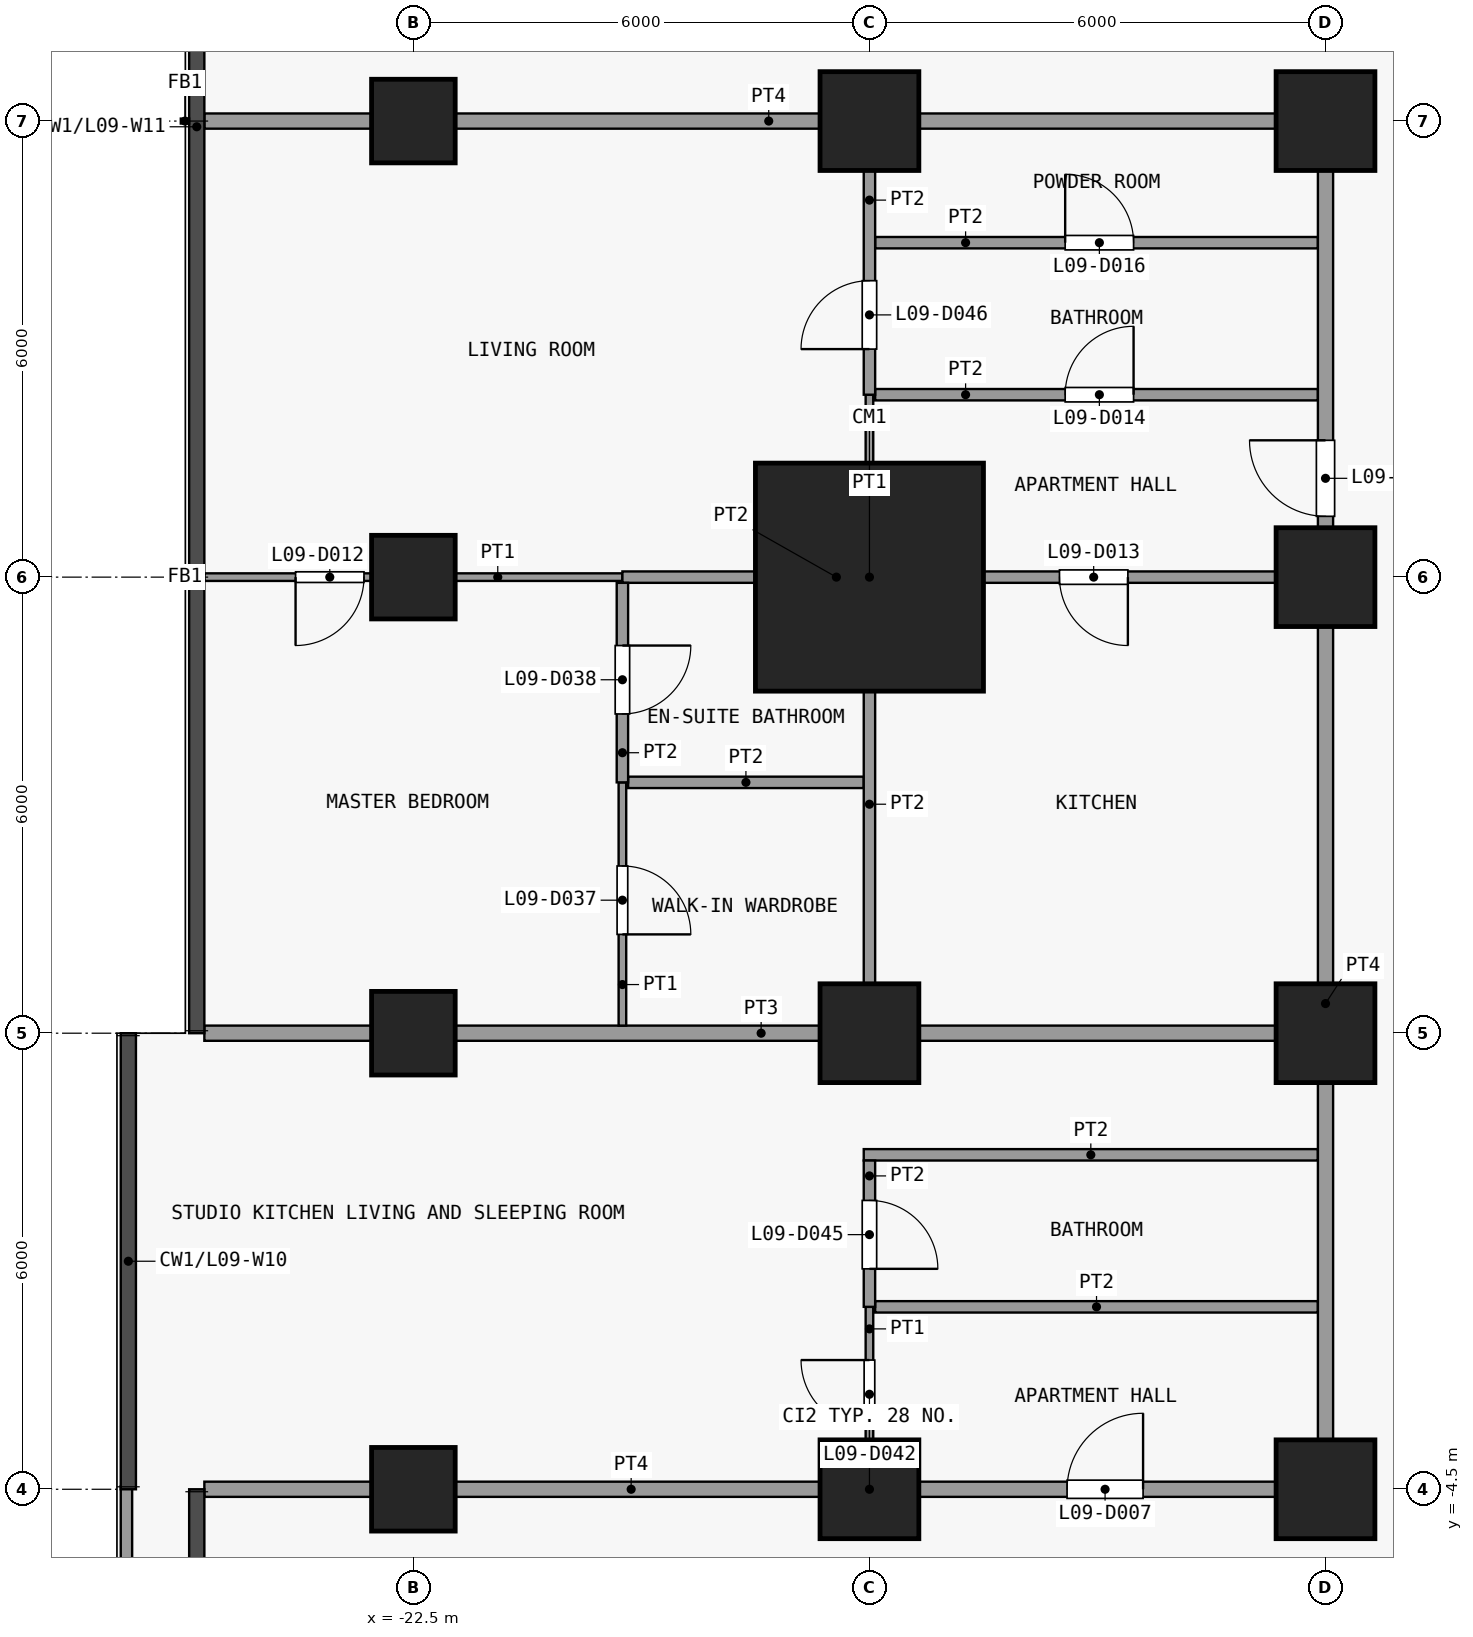
"""IFC4 building model, lengths in metres.
Left out: names, types, materials, properties, quantities, classifications, styles, units other than length and angle.
Written with IfcOpenShell. Run it as: python <this file> out.ifc"""

import sys

from ifc_helpers import new_model, si_unit, direction, frame, frame_2d, origin, origin_2d, place, context, subcontext, project, spatial, rectangle, extrude, element, fill, save


model = new_model("IFC4")
c1 = context("Model", 3, precision=1e-05, world=origin(), true_north=direction((0.0, 1.0)))
c2 = subcontext(c1, "Body", "Model", "MODEL_VIEW")
j1 = project(units=[si_unit("LENGTHUNIT", "METRE"), si_unit("PLANEANGLEUNIT", "RADIAN")], contexts=[c1])
p1 = place(None, origin())
s1 = spatial("IfcSite", under=j1, at=p1, CompositionType="ELEMENT")
p2 = place(p1, origin())
s2 = spatial("IfcBuilding", under=s1, at=p2, CompositionType="ELEMENT")
p3 = place(p2, frame((0.0, 0.0, 43.3)))
s3 = spatial("IfcBuildingStorey", under=s2, at=p3, CompositionType="ELEMENT", Elevation=43.3)
for number, where, z_axis, x_axis in (
    (1, (-22.5, -4.5, 0.0), (0.0, 0.0, 1.0), (1.0, 0.0, 0.0)),
    (2, (-22.5, 1.5, 0.0), (0.0, 0.0, 1.0), (1.0, 0.0, 0.0)),
    (3, (-22.5, 7.5, 0.0), (0.0, 0.0, 1.0), (1.0, 0.0, 0.0)),
    (4, (-22.5, 13.5, 0.0), (0.0, 0.0, 1.0), (1.0, 0.0, 0.0)),
):
    element("IfcColumn", number, at=place(p3, frame(where, z_axis=z_axis, x_axis=x_axis)), inside=s3, PredefinedType="COLUMN", context=c2, shape_type="SweptSolid", body=[
        extrude(rectangle(XDim=1.1, YDim=1.1, at=origin_2d()), origin(), (0.0, 0.0, 1.0), 3.6),
    ])
for number, where, z_axis, x_axis in (
    (5, (-16.5, -4.5, 0.0), (0.0, 0.0, 1.0), (1.0, 0.0, 0.0)),
    (6, (-16.5, 1.5, 0.0), (0.0, 0.0, 1.0), (1.0, 0.0, 0.0)),
):
    element("IfcColumn", number, at=place(p3, frame(where, z_axis=z_axis, x_axis=x_axis)), inside=s3, PredefinedType="COLUMN", context=c2, shape_type="SweptSolid", body=[
        extrude(rectangle(XDim=1.3, YDim=1.3, at=origin_2d()), origin(), (0.0, 0.0, 1.0), 3.6),
    ])
p4 = place(p3, frame((-16.5, 7.5, 0.0), z_axis=(0.0, 0.0, 1.0), x_axis=(1.0, 0.0, 0.0)))
e7 = element("IfcColumn", 7, at=p4, inside=s3, PredefinedType="COLUMN", context=c2, shape_type="SweptSolid", body=[
    extrude(rectangle(XDim=3.0, YDim=3.0, at=origin_2d()), origin(), (0.0, 0.0, 1.0), 3.6),
])
for number, where, z_axis, x_axis in (
    (8, (-16.5, 13.5, 0.0), (0.0, 0.0, 1.0), (1.0, 0.0, 0.0)),
    (9, (-10.5, -4.5, 0.0), (0.0, 0.0, 1.0), (1.0, 0.0, 0.0)),
    (10, (-10.5, 1.5, 0.0), (0.0, 0.0, 1.0), (1.0, 0.0, 0.0)),
    (11, (-10.5, 7.5, 0.0), (0.0, 0.0, 1.0), (1.0, 0.0, 0.0)),
    (12, (-10.5, 13.5, 0.0), (0.0, 0.0, 1.0), (1.0, 0.0, 0.0)),
):
    element("IfcColumn", number, at=place(p3, frame(where, z_axis=z_axis, x_axis=x_axis)), inside=s3, PredefinedType="COLUMN", context=c2, shape_type="SweptSolid", body=[
        extrude(rectangle(XDim=1.3, YDim=1.3, at=origin_2d()), origin(), (0.0, 0.0, 1.0), 3.6),
    ])
p5 = place(p3, frame((-26.275, -13.3, 0.0), z_axis=(0.0, 0.0, 1.0), x_axis=(0.0, 1.0, 0.0)))
e13 = element("IfcWall", 13, at=p5, inside=s3, PredefinedType="PARAPET", context=c2, shape_type="SweptSolid", body=[
    extrude(rectangle(XDim=8.84, YDim=0.15, at=frame_2d((4.42, 0.0))), origin(), (0.0, 0.0, 1.0), 1.15),
])
p6 = place(p3, frame((-25.25, -4.5, 0.0), z_axis=(0.0, 0.0, 1.0), x_axis=(1.0, 0.0, 0.0)))
e14 = element("IfcWall", 14, at=p6, inside=s3, PredefinedType="PARTITIONING", context=c2, shape_type="SweptSolid", body=[
    extrude(rectangle(XDim=14.85, YDim=0.2, at=frame_2d((7.425, 0.0))), origin(), (0.0, 0.0, 1.0), 3.3),
])
p7 = place(p6, frame((11.35, 0.0, 0.0)))
e15 = element("IfcOpeningElement", 15, at=p7, cuts=e14, PredefinedType="OPENING", context=c2, shape_type="SweptSolid", body=[
    extrude(rectangle(XDim=1.0, YDim=2.1, at=frame_2d((0.5, 1.05))), frame((0.0, 0.11, 0.0), z_axis=(0.0, -1.0, 0.0), x_axis=(1.0, 0.0, 0.0)), (0.0, 0.0, 1.0), 0.22),
])
p8 = place(p3, frame((-16.425, -2.1, 0.0), z_axis=(0.0, 0.0, 1.0), x_axis=(1.0, 0.0, 0.0)))
e16 = element("IfcWall", 16, at=p8, inside=s3, PredefinedType="PARTITIONING", context=c2, shape_type="SweptSolid", body=[
    extrude(rectangle(XDim=5.825, YDim=0.15, at=frame_2d((2.913, 0.0))), origin(), (0.0, 0.0, 1.0), 3.3),
])
p9 = place(p3, frame((-16.575, -0.1, 0.0), z_axis=(0.0, 0.0, 1.0), x_axis=(1.0, 0.0, 0.0)))
e17 = element("IfcWall", 17, at=p9, inside=s3, PredefinedType="PARTITIONING", context=c2, shape_type="SweptSolid", body=[
    extrude(rectangle(XDim=5.975, YDim=0.15, at=frame_2d((2.987, 0.0))), origin(), (0.0, 0.0, 1.0), 3.3),
])
p10 = place(p3, frame((-25.25, 1.5, 0.0), z_axis=(0.0, 0.0, 1.0), x_axis=(1.0, 0.0, 0.0)))
e18 = element("IfcWall", 18, at=p10, inside=s3, PredefinedType="PARTITIONING", context=c2, shape_type="SweptSolid", body=[
    extrude(rectangle(XDim=14.65, YDim=0.2, at=frame_2d((7.325, 0.0))), origin(), (0.0, 0.0, 1.0), 3.3),
])
p11 = place(p3, frame((-19.675, 4.8, 0.0), z_axis=(0.0, 0.0, 1.0), x_axis=(1.0, 0.0, 0.0)))
e19 = element("IfcWall", 19, at=p11, inside=s3, PredefinedType="PARTITIONING", context=c2, shape_type="SweptSolid", body=[
    extrude(rectangle(XDim=3.1, YDim=0.15, at=frame_2d((1.55, 0.0))), origin(), (0.0, 0.0, 1.0), 3.3),
])
p12 = place(p3, frame((-25.25, 7.5, 0.0), z_axis=(0.0, 0.0, 1.0), x_axis=(1.0, 0.0, 0.0)))
e20 = element("IfcWall", 20, at=p12, inside=s3, PredefinedType="PARTITIONING", context=c2, shape_type="SweptSolid", body=[
    extrude(rectangle(XDim=5.5, YDim=0.1, at=frame_2d((2.75, 0.0))), origin(), (0.0, 0.0, 1.0), 3.3),
])
p13 = place(p12, frame((1.2, 0.0, 0.0)))
e21 = element("IfcOpeningElement", 21, at=p13, cuts=e20, PredefinedType="OPENING", context=c2, shape_type="SweptSolid", body=[
    extrude(rectangle(XDim=0.9, YDim=2.1, at=frame_2d((0.45, 1.05))), frame((0.0, 0.06, 0.0), z_axis=(0.0, -1.0, 0.0), x_axis=(1.0, 0.0, 0.0)), (0.0, 0.0, 1.0), 0.12),
])
p14 = place(p3, frame((-19.75, 7.5, 0.0), z_axis=(0.0, 0.0, 1.0), x_axis=(1.0, 0.0, 0.0)))
e22 = element("IfcWall", 22, at=p14, inside=s3, PredefinedType="PARTITIONING", context=c2, shape_type="SweptSolid", body=[
    extrude(rectangle(XDim=9.15, YDim=0.15, at=frame_2d((4.575, 0.0))), origin(), (0.0, 0.0, 1.0), 3.3),
])
p15 = place(p14, frame((5.75, 0.0, 0.0)))
e23 = element("IfcOpeningElement", 23, at=p15, cuts=e22, PredefinedType="OPENING", context=c2, shape_type="SweptSolid", body=[
    extrude(rectangle(XDim=0.9, YDim=2.1, at=frame_2d((0.45, 1.05))), frame((0.0, 0.085, 0.0), z_axis=(0.0, -1.0, 0.0), x_axis=(1.0, 0.0, 0.0)), (0.0, 0.0, 1.0), 0.17),
])
p16 = place(p3, frame((-16.425, 9.9, 0.0), z_axis=(0.0, 0.0, 1.0), x_axis=(1.0, 0.0, 0.0)))
e24 = element("IfcWall", 24, at=p16, inside=s3, PredefinedType="PARTITIONING", context=c2, shape_type="SweptSolid", body=[
    extrude(rectangle(XDim=5.825, YDim=0.15, at=frame_2d((2.913, 0.0))), origin(), (0.0, 0.0, 1.0), 3.3),
])
p17 = place(p16, frame((2.5, 0.0, 0.0)))
e25 = element("IfcOpeningElement", 25, at=p17, cuts=e24, PredefinedType="OPENING", context=c2, shape_type="SweptSolid", body=[
    extrude(rectangle(XDim=0.9, YDim=2.1, at=frame_2d((0.45, 1.05))), frame((0.0, 0.085, 0.0), z_axis=(0.0, -1.0, 0.0), x_axis=(1.0, 0.0, 0.0)), (0.0, 0.0, 1.0), 0.17),
])
p18 = place(p3, frame((-16.425, 11.9, 0.0), z_axis=(0.0, 0.0, 1.0), x_axis=(1.0, 0.0, 0.0)))
e26 = element("IfcWall", 26, at=p18, inside=s3, PredefinedType="PARTITIONING", context=c2, shape_type="SweptSolid", body=[
    extrude(rectangle(XDim=5.825, YDim=0.15, at=frame_2d((2.913, 0.0))), origin(), (0.0, 0.0, 1.0), 3.3),
])
p19 = place(p18, frame((2.5, 0.0, 0.0)))
e27 = element("IfcOpeningElement", 27, at=p19, cuts=e26, PredefinedType="OPENING", context=c2, shape_type="SweptSolid", body=[
    extrude(rectangle(XDim=0.9, YDim=2.1, at=frame_2d((0.45, 1.05))), frame((0.0, 0.085, 0.0), z_axis=(0.0, -1.0, 0.0), x_axis=(1.0, 0.0, 0.0)), (0.0, 0.0, 1.0), 0.17),
])
p20 = place(p3, frame((-25.25, 13.5, 0.0), z_axis=(0.0, 0.0, 1.0), x_axis=(1.0, 0.0, 0.0)))
e28 = element("IfcWall", 28, at=p20, inside=s3, PredefinedType="PARTITIONING", context=c2, shape_type="SweptSolid", body=[
    extrude(rectangle(XDim=14.85, YDim=0.2, at=frame_2d((7.425, 0.0))), origin(), (0.0, 0.0, 1.0), 3.3),
])
p21 = place(p3, frame((-19.75, 1.6, 0.0), z_axis=(0.0, 0.0, 1.0), x_axis=(0.0, 1.0, 0.0)))
e29 = element("IfcWall", 29, at=p21, inside=s3, PredefinedType="PARTITIONING", context=c2, shape_type="SweptSolid", body=[
    extrude(rectangle(XDim=3.2, YDim=0.1, at=frame_2d((1.6, 0.0))), origin(), (0.0, 0.0, 1.0), 3.3),
])
p22 = place(p21, frame((1.2, 0.0, 0.0)))
e30 = element("IfcOpeningElement", 30, at=p22, cuts=e29, PredefinedType="OPENING", context=c2, shape_type="SweptSolid", body=[
    extrude(rectangle(XDim=0.9, YDim=2.1, at=frame_2d((0.45, 1.05))), frame((0.0, 0.06, 0.0), z_axis=(0.0, -1.0, 0.0), x_axis=(1.0, 0.0, 0.0)), (0.0, 0.0, 1.0), 0.12),
])
p23 = place(p3, frame((-19.75, 4.8, 0.0), z_axis=(0.0, 0.0, 1.0), x_axis=(0.0, 1.0, 0.0)))
e31 = element("IfcWall", 31, at=p23, inside=s3, PredefinedType="PARTITIONING", context=c2, shape_type="SweptSolid", body=[
    extrude(rectangle(XDim=2.625, YDim=0.15, at=frame_2d((1.312, 0.0))), origin(), (0.0, 0.0, 1.0), 3.3),
])
p24 = place(p23, frame((0.9, 0.0, 0.0)))
e32 = element("IfcOpeningElement", 32, at=p24, cuts=e31, PredefinedType="OPENING", context=c2, shape_type="SweptSolid", body=[
    extrude(rectangle(XDim=0.9, YDim=2.1, at=frame_2d((0.45, 1.05))), frame((0.0, 0.085, 0.0), z_axis=(0.0, -1.0, 0.0), x_axis=(1.0, 0.0, 0.0)), (0.0, 0.0, 1.0), 0.17),
])
p25 = place(p3, frame((-16.5, -4.4, 0.0), z_axis=(0.0, 0.0, 1.0), x_axis=(0.0, 1.0, 0.0)))
e33 = element("IfcWall", 33, at=p25, inside=s3, PredefinedType="PARTITIONING", context=c2, shape_type="SweptSolid", body=[
    extrude(rectangle(XDim=2.3, YDim=0.1, at=frame_2d((1.15, 0.0))), origin(), (0.0, 0.0, 1.0), 3.3),
])
p26 = place(p25, frame((0.7, 0.0, 0.0)))
e34 = element("IfcOpeningElement", 34, at=p26, cuts=e33, PredefinedType="OPENING", context=c2, shape_type="SweptSolid", body=[
    extrude(rectangle(XDim=0.9, YDim=2.1, at=frame_2d((0.45, 1.05))), frame((0.0, 0.06, 0.0), z_axis=(0.0, -1.0, 0.0), x_axis=(1.0, 0.0, 0.0)), (0.0, 0.0, 1.0), 0.12),
])
p27 = place(p3, frame((-16.5, 7.575, 0.0), z_axis=(0.0, 0.0, 1.0), x_axis=(0.0, 1.0, 0.0)))
e35 = element("IfcWall", 35, at=p27, inside=s3, PredefinedType="PARTITIONING", context=c2, shape_type="SweptSolid", body=[
    extrude(rectangle(XDim=2.325, YDim=0.1, at=frame_2d((1.163, 0.0))), origin(), (0.0, 0.0, 1.0), 3.3),
])
p28 = place(p3, frame((-16.5, -2.1, 0.0), z_axis=(0.0, 0.0, 1.0), x_axis=(0.0, 1.0, 0.0)))
e36 = element("IfcWall", 36, at=p28, inside=s3, PredefinedType="PARTITIONING", context=c2, shape_type="SweptSolid", body=[
    extrude(rectangle(XDim=1.925, YDim=0.15, at=frame_2d((0.962, 0.0))), origin(), (0.0, 0.0, 1.0), 3.3),
])
p29 = place(p28, frame((0.5, 0.0, 0.0)))
e37 = element("IfcOpeningElement", 37, at=p29, cuts=e36, PredefinedType="OPENING", context=c2, shape_type="SweptSolid", body=[
    extrude(rectangle(XDim=0.9, YDim=2.1, at=frame_2d((0.45, 1.05))), frame((0.0, 0.085, 0.0), z_axis=(0.0, -1.0, 0.0), x_axis=(1.0, 0.0, 0.0)), (0.0, 0.0, 1.0), 0.17),
])
p30 = place(p3, frame((-16.5, 1.6, 0.0), z_axis=(0.0, 0.0, 1.0), x_axis=(0.0, 1.0, 0.0)))
e38 = element("IfcWall", 38, at=p30, inside=s3, PredefinedType="PARTITIONING", context=c2, shape_type="SweptSolid", body=[
    extrude(rectangle(XDim=5.825, YDim=0.15, at=frame_2d((2.913, 0.0))), origin(), (0.0, 0.0, 1.0), 3.3),
])
p31 = place(p3, frame((-16.5, 9.9, 0.0), z_axis=(0.0, 0.0, 1.0), x_axis=(0.0, 1.0, 0.0)))
e39 = element("IfcWall", 39, at=p31, inside=s3, PredefinedType="PARTITIONING", context=c2, shape_type="SweptSolid", body=[
    extrude(rectangle(XDim=3.5, YDim=0.15, at=frame_2d((1.75, 0.0))), origin(), (0.0, 0.0, 1.0), 3.3),
])
p32 = place(p31, frame((0.6, 0.0, 0.0)))
e40 = element("IfcOpeningElement", 40, at=p32, cuts=e39, PredefinedType="OPENING", context=c2, shape_type="SweptSolid", body=[
    extrude(rectangle(XDim=0.9, YDim=2.1, at=frame_2d((0.45, 1.05))), frame((0.0, 0.085, 0.0), z_axis=(0.0, -1.0, 0.0), x_axis=(1.0, 0.0, 0.0)), (0.0, 0.0, 1.0), 0.17),
])
p33 = place(p3, frame((-10.5, -4.4, 0.0), z_axis=(0.0, 0.0, 1.0), x_axis=(0.0, 1.0, 0.0)))
e41 = element("IfcWall", 41, at=p33, inside=s3, PredefinedType="PARTITIONING", context=c2, shape_type="SweptSolid", body=[
    extrude(rectangle(XDim=17.8, YDim=0.2, at=frame_2d((8.9, 0.0))), origin(), (0.0, 0.0, 1.0), 3.3),
])
p34 = place(p33, frame((12.7, 0.0, 0.0)))
e42 = element("IfcOpeningElement", 42, at=p34, cuts=e41, PredefinedType="OPENING", context=c2, shape_type="SweptSolid", body=[
    extrude(rectangle(XDim=1.0, YDim=2.1, at=frame_2d((0.5, 1.05))), frame((0.0, 0.11, 0.0), z_axis=(0.0, -1.0, 0.0), x_axis=(1.0, 0.0, 0.0)), (0.0, 0.0, 1.0), 0.22),
])
p35 = place(p7, origin())
e43 = element("IfcDoor", 43, at=p35, inside=s3, OperationType="SINGLE_SWING_LEFT", PredefinedType="DOOR", context=c2, shape_type="SweptSolid", body=[
    extrude(rectangle(XDim=1.0, YDim=2.1, at=frame_2d((0.5, 1.05))), frame((0.0, 0.025, 0.0), z_axis=(0.0, -1.0, 0.0), x_axis=(1.0, 0.0, 0.0)), (0.0, 0.0, 1.0), 0.05),
])
fill(e15, e43)
p36 = place(p13, origin())
e44 = element("IfcDoor", 44, at=p36, inside=s3, OperationType="SINGLE_SWING_LEFT", PredefinedType="DOOR", context=c2, shape_type="SweptSolid", body=[
    extrude(rectangle(XDim=0.9, YDim=2.1, at=frame_2d((0.45, 1.05))), frame((0.0, 0.025, 0.0), z_axis=(0.0, -1.0, 0.0), x_axis=(1.0, 0.0, 0.0)), (0.0, 0.0, 1.0), 0.05),
])
fill(e21, e44)
p37 = place(p15, origin())
e45 = element("IfcDoor", 45, at=p37, inside=s3, OperationType="SINGLE_SWING_RIGHT", PredefinedType="DOOR", context=c2, shape_type="SweptSolid", body=[
    extrude(rectangle(XDim=0.9, YDim=2.1, at=frame_2d((0.45, 1.05))), frame((0.0, 0.025, 0.0), z_axis=(0.0, -1.0, 0.0), x_axis=(1.0, 0.0, 0.0)), (0.0, 0.0, 1.0), 0.05),
])
fill(e23, e45)
p38 = place(p17, origin())
e46 = element("IfcDoor", 46, at=p38, inside=s3, OperationType="SINGLE_SWING_LEFT", PredefinedType="DOOR", context=c2, shape_type="SweptSolid", body=[
    extrude(rectangle(XDim=0.9, YDim=2.1, at=frame_2d((0.45, 1.05))), frame((0.0, 0.025, 0.0), z_axis=(0.0, -1.0, 0.0), x_axis=(1.0, 0.0, 0.0)), (0.0, 0.0, 1.0), 0.05),
])
fill(e25, e46)
p39 = place(p19, origin())
e47 = element("IfcDoor", 47, at=p39, inside=s3, OperationType="SINGLE_SWING_RIGHT", PredefinedType="DOOR", context=c2, shape_type="SweptSolid", body=[
    extrude(rectangle(XDim=0.9, YDim=2.1, at=frame_2d((0.45, 1.05))), frame((0.0, 0.025, 0.0), z_axis=(0.0, -1.0, 0.0), x_axis=(1.0, 0.0, 0.0)), (0.0, 0.0, 1.0), 0.05),
])
fill(e27, e47)
p40 = place(p22, origin())
e48 = element("IfcDoor", 48, at=p40, inside=s3, OperationType="SINGLE_SWING_LEFT", PredefinedType="DOOR", context=c2, shape_type="SweptSolid", body=[
    extrude(rectangle(XDim=0.9, YDim=2.1, at=frame_2d((0.45, 1.05))), frame((0.0, 0.025, 0.0), z_axis=(0.0, -1.0, 0.0), x_axis=(1.0, 0.0, 0.0)), (0.0, 0.0, 1.0), 0.05),
])
fill(e30, e48)
p41 = place(p24, origin())
e49 = element("IfcDoor", 49, at=p41, inside=s3, OperationType="SINGLE_SWING_RIGHT", PredefinedType="DOOR", context=c2, shape_type="SweptSolid", body=[
    extrude(rectangle(XDim=0.9, YDim=2.1, at=frame_2d((0.45, 1.05))), frame((0.0, 0.025, 0.0), z_axis=(0.0, -1.0, 0.0), x_axis=(1.0, 0.0, 0.0)), (0.0, 0.0, 1.0), 0.05),
])
fill(e32, e49)
p42 = place(p26, origin())
e50 = element("IfcDoor", 50, at=p42, inside=s3, OperationType="SINGLE_SWING_LEFT", PredefinedType="DOOR", context=c2, shape_type="SweptSolid", body=[
    extrude(rectangle(XDim=0.9, YDim=2.1, at=frame_2d((0.45, 1.05))), frame((0.0, 0.025, 0.0), z_axis=(0.0, -1.0, 0.0), x_axis=(1.0, 0.0, 0.0)), (0.0, 0.0, 1.0), 0.05),
])
fill(e34, e50)
p43 = place(p29, origin())
e51 = element("IfcDoor", 51, at=p43, inside=s3, OperationType="SINGLE_SWING_LEFT", PredefinedType="DOOR", context=c2, shape_type="SweptSolid", body=[
    extrude(rectangle(XDim=0.9, YDim=2.1, at=frame_2d((0.45, 1.05))), frame((0.0, 0.025, 0.0), z_axis=(0.0, -1.0, 0.0), x_axis=(1.0, 0.0, 0.0)), (0.0, 0.0, 1.0), 0.05),
])
fill(e37, e51)
p44 = place(p32, origin())
e52 = element("IfcDoor", 52, at=p44, inside=s3, OperationType="SINGLE_SWING_RIGHT", PredefinedType="DOOR", context=c2, shape_type="SweptSolid", body=[
    extrude(rectangle(XDim=0.9, YDim=2.1, at=frame_2d((0.45, 1.05))), frame((0.0, 0.025, 0.0), z_axis=(0.0, -1.0, 0.0), x_axis=(1.0, 0.0, 0.0)), (0.0, 0.0, 1.0), 0.05),
])
fill(e40, e52)
p45 = place(p34, origin())
e53 = element("IfcDoor", 53, at=p45, inside=s3, OperationType="SINGLE_SWING_LEFT", PredefinedType="DOOR", context=c2, shape_type="SweptSolid", body=[
    extrude(rectangle(XDim=1.0, YDim=2.1, at=frame_2d((0.5, 1.05))), frame((0.0, 0.025, 0.0), z_axis=(0.0, -1.0, 0.0), x_axis=(1.0, 0.0, 0.0)), (0.0, 0.0, 1.0), 0.05),
])
fill(e42, e53)
save(model, sys.argv[1])
